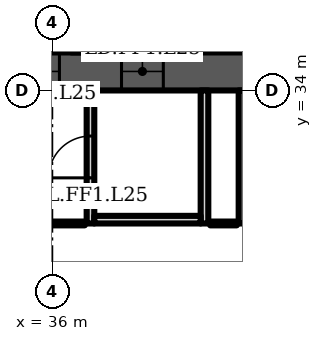
"""IFC4 building model, lengths in metres.
Left out: names, types, materials, properties, quantities, classifications, styles, units other than length and angle.
Written with IfcOpenShell. Run it as: python <this file> out.ifc"""

import sys

from ifc_helpers import new_model, si_unit, direction, frame, frame_2d, origin, place, context, subcontext, project, spatial, rectangle, extrude, element, fill, save


model = new_model("IFC4")
c1 = context("Model", 3, precision=1e-05, world=origin(), true_north=direction((0.0, 1.0)))
c2 = subcontext(c1, "Body", "Model", "MODEL_VIEW")
j1 = project(units=[si_unit("LENGTHUNIT", "METRE"), si_unit("PLANEANGLEUNIT", "RADIAN")], contexts=[c1])
p1 = place(None, origin())
s1 = spatial("IfcSite", under=j1, at=p1, CompositionType="ELEMENT")
p2 = place(p1, origin())
s2 = spatial("IfcBuilding", under=s1, at=p2, CompositionType="ELEMENT")
p3 = place(p2, frame((0.0, 0.0, 111.1)))
s3 = spatial("IfcBuildingStorey", under=s2, at=p3, CompositionType="ELEMENT", Elevation=111.1)
p4 = place(p3, frame((16.0, 34.5, 0.0), z_axis=(0.0, 0.0, 1.0), x_axis=(1.0, 0.0, 0.0)))
e1 = element("IfcWall", 1, at=p4, inside=s3, PredefinedType="SHEAR", context=c2, shape_type="SweptSolid", body=[
    extrude(rectangle(XDim=49.0, YDim=1.0, at=frame_2d((24.5, 0.0))), origin(), (0.0, 0.0, 1.0), 3.6),
])
p5 = place(p4, frame((1.2, 0.0, 0.0)))
e2 = element("IfcOpeningElement", 2, at=p5, cuts=e1, PredefinedType="OPENING", context=c2, shape_type="SweptSolid", body=[
    extrude(rectangle(XDim=1.1, YDim=2.1, at=frame_2d((0.55, 1.05))), frame((0.0, 0.51, 0.0), z_axis=(0.0, -1.0, 0.0), x_axis=(1.0, 0.0, 0.0)), (0.0, 0.0, 1.0), 1.02),
])
p6 = place(p4, frame((5.083, 0.0, 0.0)))
e3 = element("IfcOpeningElement", 3, at=p6, cuts=e1, PredefinedType="OPENING", context=c2, shape_type="SweptSolid", body=[
    extrude(rectangle(XDim=1.1, YDim=2.1, at=frame_2d((0.55, 1.05))), frame((0.0, 0.51, 0.0), z_axis=(0.0, -1.0, 0.0), x_axis=(1.0, 0.0, 0.0)), (0.0, 0.0, 1.0), 1.02),
])
p7 = place(p4, frame((2.933, 0.0, 0.0)))
e4 = element("IfcOpeningElement", 4, at=p7, cuts=e1, PredefinedType="OPENING", context=c2, shape_type="SweptSolid", body=[
    extrude(rectangle(XDim=1.4, YDim=2.1, at=frame_2d((0.7, 1.05))), frame((0.0, 0.51, 0.0), z_axis=(0.0, -1.0, 0.0), x_axis=(1.0, 0.0, 0.0)), (0.0, 0.0, 1.0), 1.02),
])
p8 = place(p4, frame((7.65, 0.0, 0.0)))
e5 = element("IfcOpeningElement", 5, at=p8, cuts=e1, PredefinedType="OPENING", context=c2, shape_type="SweptSolid", body=[
    extrude(rectangle(XDim=1.2, YDim=2.1, at=frame_2d((0.6, 1.05))), frame((0.0, 0.51, 0.0), z_axis=(0.0, -1.0, 0.0), x_axis=(1.0, 0.0, 0.0)), (0.0, 0.0, 1.0), 1.02),
])
p9 = place(p4, frame((14.817, 0.0, 0.0)))
e6 = element("IfcOpeningElement", 6, at=p9, cuts=e1, PredefinedType="OPENING", context=c2, shape_type="SweptSolid", body=[
    extrude(rectangle(XDim=1.1, YDim=2.1, at=frame_2d((0.55, 1.05))), frame((0.0, 0.51, 0.0), z_axis=(0.0, -1.0, 0.0), x_axis=(1.0, 0.0, 0.0)), (0.0, 0.0, 1.0), 1.02),
])
p10 = place(p4, frame((19.083, 0.0, 0.0)))
e7 = element("IfcOpeningElement", 7, at=p10, cuts=e1, PredefinedType="OPENING", context=c2, shape_type="SweptSolid", body=[
    extrude(rectangle(XDim=1.1, YDim=2.1, at=frame_2d((0.55, 1.05))), frame((0.0, 0.51, 0.0), z_axis=(0.0, -1.0, 0.0), x_axis=(1.0, 0.0, 0.0)), (0.0, 0.0, 1.0), 1.02),
])
p11 = place(p4, frame((16.8, 0.0, 0.0)))
e8 = element("IfcOpeningElement", 8, at=p11, cuts=e1, PredefinedType="OPENING", context=c2, shape_type="SweptSolid", body=[
    extrude(rectangle(XDim=1.4, YDim=2.1, at=frame_2d((0.7, 1.05))), frame((0.0, 0.51, 0.0), z_axis=(0.0, -1.0, 0.0), x_axis=(1.0, 0.0, 0.0)), (0.0, 0.0, 1.0), 1.02),
])
p12 = place(p4, frame((21.817, 0.0, 0.0)))
e9 = element("IfcOpeningElement", 9, at=p12, cuts=e1, PredefinedType="OPENING", context=c2, shape_type="SweptSolid", body=[
    extrude(rectangle(XDim=1.1, YDim=2.1, at=frame_2d((0.55, 1.05))), frame((0.0, 0.51, 0.0), z_axis=(0.0, -1.0, 0.0), x_axis=(1.0, 0.0, 0.0)), (0.0, 0.0, 1.0), 1.02),
])
p13 = place(p4, frame((26.083, 0.0, 0.0)))
e10 = element("IfcOpeningElement", 10, at=p13, cuts=e1, PredefinedType="OPENING", context=c2, shape_type="SweptSolid", body=[
    extrude(rectangle(XDim=1.1, YDim=2.1, at=frame_2d((0.55, 1.05))), frame((0.0, 0.51, 0.0), z_axis=(0.0, -1.0, 0.0), x_axis=(1.0, 0.0, 0.0)), (0.0, 0.0, 1.0), 1.02),
])
p14 = place(p4, frame((33.15, 0.0, 0.0)))
e11 = element("IfcOpeningElement", 11, at=p14, cuts=e1, PredefinedType="OPENING", context=c2, shape_type="SweptSolid", body=[
    extrude(rectangle(XDim=1.2, YDim=2.1, at=frame_2d((0.6, 1.05))), frame((0.0, 0.51, 0.0), z_axis=(0.0, -1.0, 0.0), x_axis=(1.0, 0.0, 0.0)), (0.0, 0.0, 1.0), 1.02),
])
p15 = place(p4, frame((37.8, 0.0, 0.0)))
e12 = element("IfcOpeningElement", 12, at=p15, cuts=e1, PredefinedType="OPENING", context=c2, shape_type="SweptSolid", body=[
    extrude(rectangle(XDim=1.4, YDim=2.1, at=frame_2d((0.7, 1.05))), frame((0.0, 0.51, 0.0), z_axis=(0.0, -1.0, 0.0), x_axis=(1.0, 0.0, 0.0)), (0.0, 0.0, 1.0), 1.02),
])
p16 = place(p4, frame((42.817, 0.0, 0.0)))
e13 = element("IfcOpeningElement", 13, at=p16, cuts=e1, PredefinedType="OPENING", context=c2, shape_type="SweptSolid", body=[
    extrude(rectangle(XDim=1.1, YDim=2.1, at=frame_2d((0.55, 1.05))), frame((0.0, 0.51, 0.0), z_axis=(0.0, -1.0, 0.0), x_axis=(1.0, 0.0, 0.0)), (0.0, 0.0, 1.0), 1.02),
])
p17 = place(p4, frame((46.7, 0.0, 0.0)))
e14 = element("IfcOpeningElement", 14, at=p17, cuts=e1, PredefinedType="OPENING", context=c2, shape_type="SweptSolid", body=[
    extrude(rectangle(XDim=1.1, YDim=2.1, at=frame_2d((0.55, 1.05))), frame((0.0, 0.51, 0.0), z_axis=(0.0, -1.0, 0.0), x_axis=(1.0, 0.0, 0.0)), (0.0, 0.0, 1.0), 1.02),
])
p18 = place(p4, frame((44.667, 0.0, 0.0)))
e15 = element("IfcOpeningElement", 15, at=p18, cuts=e1, PredefinedType="OPENING", context=c2, shape_type="SweptSolid", body=[
    extrude(rectangle(XDim=1.4, YDim=2.1, at=frame_2d((0.7, 1.05))), frame((0.0, 0.51, 0.0), z_axis=(0.0, -1.0, 0.0), x_axis=(1.0, 0.0, 0.0)), (0.0, 0.0, 1.0), 1.02),
])
p19 = place(p3, frame((37.0, 30.5, 0.0), z_axis=(0.0, 0.0, 1.0), x_axis=(0.0, 1.0, 0.0)))
e16 = element("IfcWall", 16, at=p19, inside=s3, PredefinedType="PARTITIONING", context=c2, shape_type="SweptSolid", body=[
    extrude(rectangle(XDim=3.5, YDim=0.2, at=frame_2d((1.75, 0.0))), origin(), (0.0, 0.0, 1.0), 3.2),
])
p20 = place(p19, frame((1.2, 0.0, 0.0)))
e17 = element("IfcOpeningElement", 17, at=p20, cuts=e16, PredefinedType="OPENING", context=c2, shape_type="SweptSolid", body=[
    extrude(rectangle(XDim=1.1, YDim=2.1, at=frame_2d((0.55, 1.05))), frame((0.0, 0.11, 0.0), z_axis=(0.0, -1.0, 0.0), x_axis=(1.0, 0.0, 0.0)), (0.0, 0.0, 1.0), 0.22),
])
p21 = place(p3, frame((40.0, 30.5, 0.0), z_axis=(0.0, 0.0, 1.0), x_axis=(0.0, 1.0, 0.0)))
e18 = element("IfcWall", 18, at=p21, inside=s3, PredefinedType="PARTITIONING", context=c2, shape_type="SweptSolid", body=[
    extrude(rectangle(XDim=3.5, YDim=0.2, at=frame_2d((1.75, 0.0))), origin(), (0.0, 0.0, 1.0), 3.2),
])
p22 = place(p3, frame((37.1, 30.6, 0.0), z_axis=(0.0, 0.0, 1.0), x_axis=(1.0, 0.0, 0.0)))
e19 = element("IfcWall", 19, at=p22, inside=s3, PredefinedType="PARTITIONING", context=c2, shape_type="SweptSolid", body=[
    extrude(rectangle(XDim=2.8, YDim=0.2, at=frame_2d((1.4, 0.0))), origin(), (0.0, 0.0, 1.0), 3.2),
])
p23 = place(p3, frame((41.0, 30.5, 0.0), z_axis=(0.0, 0.0, 1.0), x_axis=(0.0, 1.0, 0.0)))
e20 = element("IfcWall", 20, at=p23, inside=s3, PredefinedType="PARTITIONING", context=c2, shape_type="SweptSolid", body=[
    extrude(rectangle(XDim=3.5, YDim=0.2, at=frame_2d((1.75, 0.0))), origin(), (0.0, 0.0, 1.0), 3.2),
])
p24 = place(p3, frame((33.4, 30.5, 0.0), z_axis=(0.0, 0.0, 1.0), x_axis=(1.0, 0.0, 0.0)))
e21 = element("IfcWall", 21, at=p24, inside=s3, PredefinedType="PARTITIONING", context=c2, shape_type="SweptSolid", body=[
    extrude(rectangle(XDim=3.45, YDim=0.1, at=frame_2d((1.725, 0.0))), origin(), (0.0, 0.0, 1.0), 3.2),
])
p25 = place(p3, frame((40.15, 30.5, 0.0), z_axis=(0.0, 0.0, 1.0), x_axis=(1.0, 0.0, 0.0)))
e22 = element("IfcWall", 22, at=p25, inside=s3, PredefinedType="PARTITIONING", context=c2, shape_type="SweptSolid", body=[
    extrude(rectangle(XDim=0.7, YDim=0.1, at=frame_2d((0.35, 0.0))), origin(), (0.0, 0.0, 1.0), 3.2),
])
p26 = place(p10, origin())
e23 = element("IfcDoor", 23, at=p26, inside=s3, OperationType="DOUBLE_DOOR_SLIDING", PredefinedType="DOOR", context=c2, shape_type="SweptSolid", body=[
    extrude(rectangle(XDim=1.1, YDim=2.1, at=frame_2d((0.55, 1.05))), frame((0.0, 0.025, 0.0), z_axis=(0.0, -1.0, 0.0), x_axis=(1.0, 0.0, 0.0)), (0.0, 0.0, 1.0), 0.05),
])
fill(e7, e23)
p27 = place(p12, origin())
e24 = element("IfcDoor", 24, at=p27, inside=s3, OperationType="DOUBLE_DOOR_SLIDING", PredefinedType="DOOR", context=c2, shape_type="SweptSolid", body=[
    extrude(rectangle(XDim=1.1, YDim=2.1, at=frame_2d((0.55, 1.05))), frame((0.0, 0.025, 0.0), z_axis=(0.0, -1.0, 0.0), x_axis=(1.0, 0.0, 0.0)), (0.0, 0.0, 1.0), 0.05),
])
fill(e9, e24)
p28 = place(p20, origin())
e25 = element("IfcDoor", 25, at=p28, inside=s3, OperationType="SINGLE_SWING_LEFT", PredefinedType="DOOR", context=c2, shape_type="SweptSolid", body=[
    extrude(rectangle(XDim=1.1, YDim=2.1, at=frame_2d((0.55, 1.05))), frame((0.0, 0.025, 0.0), z_axis=(0.0, -1.0, 0.0), x_axis=(1.0, 0.0, 0.0)), (0.0, 0.0, 1.0), 0.05),
])
fill(e17, e25)
save(model, sys.argv[1])
